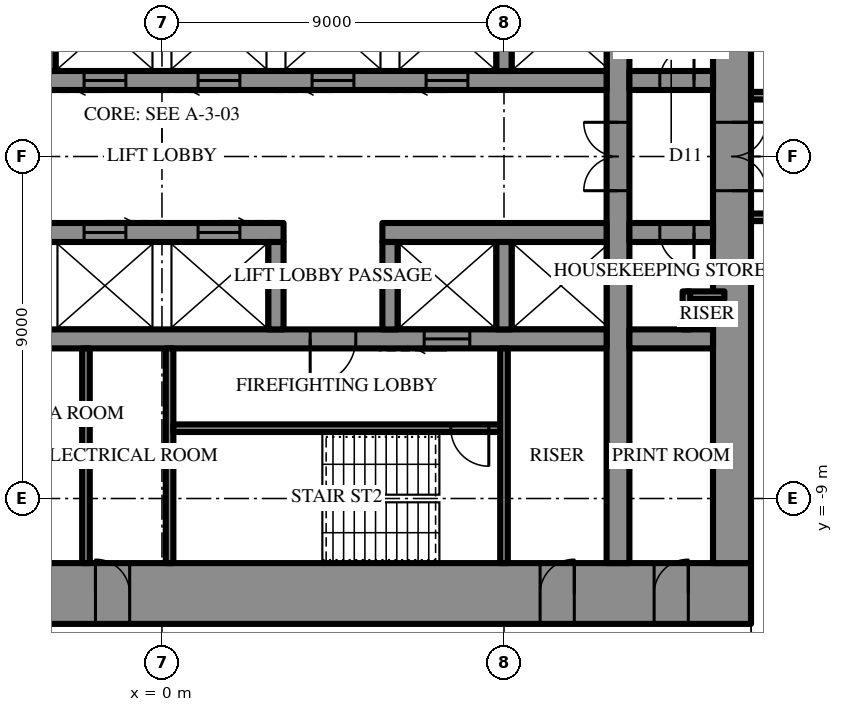
"""IFC4 building model, lengths in metres.
Left out: names, types, materials, properties, quantities, classifications, styles, units other than length and angle.
Written with IfcOpenShell. Run it as: python <this file> out.ifc"""

import sys

from ifc_helpers import new_model, si_unit, direction, frame, frame_2d, origin, place, context, subcontext, project, spatial, rectangle, extrude, element, fill, save


model = new_model("IFC4")
c1 = context("Model", 3, precision=1e-05, world=origin(), true_north=direction((0.0, 1.0)))
c2 = subcontext(c1, "Body", "Model", "MODEL_VIEW")
j1 = project(units=[si_unit("LENGTHUNIT", "METRE"), si_unit("PLANEANGLEUNIT", "RADIAN")], contexts=[c1])
p1 = place(None, origin())
s1 = spatial("IfcSite", under=j1, at=p1, CompositionType="ELEMENT")
p2 = place(p1, origin())
s2 = spatial("IfcBuilding", under=s1, at=p2, CompositionType="ELEMENT")
p3 = place(p2, frame((0.0, 0.0, 253.3)))
s3 = spatial("IfcBuildingStorey", under=s2, at=p3, CompositionType="ELEMENT", Elevation=253.3)
p4 = place(p3, frame((15.5, -11.5, 0.0), z_axis=(0.0, 0.0, 1.0), x_axis=(-1.0, 0.0, 0.0)))
e1 = element("IfcWall", 1, at=p4, inside=s3, PredefinedType="SHEAR", context=c2, shape_type="SweptSolid", body=[
    extrude(rectangle(XDim=31.0, YDim=1.6, at=frame_2d((15.5, 0.0))), origin(), (0.0, 0.0, 1.0), 4.2),
])
p5 = place(p4, frame((16.35, 0.0, 0.0)))
e2 = element("IfcOpeningElement", 2, at=p5, cuts=e1, PredefinedType="OPENING", context=c2, shape_type="SweptSolid", body=[
    extrude(rectangle(XDim=0.9, YDim=2.2, at=frame_2d((0.45, 1.1))), frame((0.0, 0.81, 0.0), z_axis=(0.0, -1.0, 0.0), x_axis=(1.0, 0.0, 0.0)), (0.0, 0.0, 1.0), 1.62),
])
p6 = place(p4, frame((19.35, 0.0, 0.0)))
e3 = element("IfcOpeningElement", 3, at=p6, cuts=e1, PredefinedType="OPENING", context=c2, shape_type="SweptSolid", body=[
    extrude(rectangle(XDim=0.9, YDim=2.2, at=frame_2d((0.45, 1.1))), frame((0.0, 0.81, 0.0), z_axis=(0.0, -1.0, 0.0), x_axis=(1.0, 0.0, 0.0)), (0.0, 0.0, 1.0), 1.62),
])
p7 = place(p4, frame((22.4, 0.0, 0.0)))
e4 = element("IfcOpeningElement", 4, at=p7, cuts=e1, PredefinedType="OPENING", context=c2, shape_type="SweptSolid", body=[
    extrude(rectangle(XDim=1.0, YDim=2.2, at=frame_2d((0.5, 1.1))), frame((0.0, 0.81, 0.0), z_axis=(0.0, -1.0, 0.0), x_axis=(1.0, 0.0, 0.0)), (0.0, 0.0, 1.0), 1.62),
])
p8 = place(p4, frame((1.65, 0.0, 0.0)))
e5 = element("IfcOpeningElement", 5, at=p8, cuts=e1, PredefinedType="OPENING", context=c2, shape_type="SweptSolid", body=[
    extrude(rectangle(XDim=0.9, YDim=2.2, at=frame_2d((0.45, 1.1))), frame((0.0, 0.81, 0.0), z_axis=(0.0, -1.0, 0.0), x_axis=(1.0, 0.0, 0.0)), (0.0, 0.0, 1.0), 1.62),
])
p9 = place(p4, frame((4.65, 0.0, 0.0)))
e6 = element("IfcOpeningElement", 6, at=p9, cuts=e1, PredefinedType="OPENING", context=c2, shape_type="SweptSolid", body=[
    extrude(rectangle(XDim=0.9, YDim=2.2, at=frame_2d((0.45, 1.1))), frame((0.0, 0.81, 0.0), z_axis=(0.0, -1.0, 0.0), x_axis=(1.0, 0.0, 0.0)), (0.0, 0.0, 1.0), 1.62),
])
p10 = place(p4, frame((25.45, 0.0, 0.0)))
e7 = element("IfcOpeningElement", 7, at=p10, cuts=e1, PredefinedType="OPENING", context=c2, shape_type="SweptSolid", body=[
    extrude(rectangle(XDim=0.9, YDim=2.2, at=frame_2d((0.45, 1.1))), frame((0.0, 0.81, 0.0), z_axis=(0.0, -1.0, 0.0), x_axis=(1.0, 0.0, 0.0)), (0.0, 0.0, 1.0), 1.62),
])
p11 = place(p4, frame((28.45, 0.0, 0.0)))
e8 = element("IfcOpeningElement", 8, at=p11, cuts=e1, PredefinedType="OPENING", context=c2, shape_type="SweptSolid", body=[
    extrude(rectangle(XDim=0.9, YDim=2.2, at=frame_2d((0.45, 1.1))), frame((0.0, 0.81, 0.0), z_axis=(0.0, -1.0, 0.0), x_axis=(1.0, 0.0, 0.0)), (0.0, 0.0, 1.0), 1.62),
])
p12 = place(p3, frame((15.0, -10.7, 0.0), z_axis=(0.0, 0.0, 1.0), x_axis=(0.0, 1.0, 0.0)))
e9 = element("IfcWall", 9, at=p12, inside=s3, PredefinedType="SHEAR", context=c2, shape_type="SweptSolid", body=[
    extrude(rectangle(XDim=21.4, YDim=1.0, at=frame_2d((10.7, 0.0))), origin(), (0.0, 0.0, 1.0), 4.2),
])
p13 = place(p12, frame((9.8, 0.0, 0.0)))
e10 = element("IfcOpeningElement", 10, at=p13, cuts=e9, PredefinedType="OPENING", context=c2, shape_type="SweptSolid", body=[
    extrude(rectangle(XDim=1.8, YDim=2.4, at=frame_2d((0.9, 1.2))), frame((0.0, 0.51, 0.0), z_axis=(0.0, -1.0, 0.0), x_axis=(1.0, 0.0, 0.0)), (0.0, 0.0, 1.0), 1.02),
])
p14 = place(p3, frame((12.0, -10.7, 0.0), z_axis=(0.0, 0.0, 1.0), x_axis=(0.0, 1.0, 0.0)))
e11 = element("IfcWall", 11, at=p14, inside=s3, PredefinedType="SHEAR", context=c2, shape_type="SweptSolid", body=[
    extrude(rectangle(XDim=21.4, YDim=0.6, at=frame_2d((10.7, 0.0))), origin(), (0.0, 0.0, 1.0), 4.2),
])
p15 = place(p14, frame((9.8, 0.0, 0.0)))
e12 = element("IfcOpeningElement", 12, at=p15, cuts=e11, PredefinedType="OPENING", context=c2, shape_type="SweptSolid", body=[
    extrude(rectangle(XDim=1.8, YDim=2.4, at=frame_2d((0.9, 1.2))), frame((0.0, 0.31, 0.0), z_axis=(0.0, -1.0, 0.0), x_axis=(1.0, 0.0, 0.0)), (0.0, 0.0, 1.0), 0.62),
])
p16 = place(p3, frame((-3.2, 2.0, 0.0), z_axis=(0.0, 0.0, 1.0), x_axis=(1.0, 0.0, 0.0)))
e13 = element("IfcWall", 13, at=p16, inside=s3, PredefinedType="SHEAR", context=c2, shape_type="SweptSolid", body=[
    extrude(rectangle(XDim=14.9, YDim=0.5, at=frame_2d((7.45, 0.0))), origin(), (0.0, 0.0, 1.0), 4.2),
])
p17 = place(p16, frame((1.15, 0.0, 0.0)))
e14 = element("IfcOpeningElement", 14, at=p17, cuts=e13, PredefinedType="OPENING", context=c2, shape_type="SweptSolid", body=[
    extrude(rectangle(XDim=1.1, YDim=2.2, at=frame_2d((0.55, 1.1))), frame((0.0, 0.26, 0.0), z_axis=(0.0, -1.0, 0.0), x_axis=(1.0, 0.0, 0.0)), (0.0, 0.0, 1.0), 0.52),
])
p18 = place(p16, frame((4.15, 0.0, 0.0)))
e15 = element("IfcOpeningElement", 15, at=p18, cuts=e13, PredefinedType="OPENING", context=c2, shape_type="SweptSolid", body=[
    extrude(rectangle(XDim=1.1, YDim=2.2, at=frame_2d((0.55, 1.1))), frame((0.0, 0.26, 0.0), z_axis=(0.0, -1.0, 0.0), x_axis=(1.0, 0.0, 0.0)), (0.0, 0.0, 1.0), 0.52),
])
p19 = place(p16, frame((7.15, 0.0, 0.0)))
e16 = element("IfcOpeningElement", 16, at=p19, cuts=e13, PredefinedType="OPENING", context=c2, shape_type="SweptSolid", body=[
    extrude(rectangle(XDim=1.1, YDim=2.2, at=frame_2d((0.55, 1.1))), frame((0.0, 0.26, 0.0), z_axis=(0.0, -1.0, 0.0), x_axis=(1.0, 0.0, 0.0)), (0.0, 0.0, 1.0), 0.52),
])
p20 = place(p16, frame((10.15, 0.0, 0.0)))
e17 = element("IfcOpeningElement", 17, at=p20, cuts=e13, PredefinedType="OPENING", context=c2, shape_type="SweptSolid", body=[
    extrude(rectangle(XDim=1.1, YDim=2.2, at=frame_2d((0.55, 1.1))), frame((0.0, 0.26, 0.0), z_axis=(0.0, -1.0, 0.0), x_axis=(1.0, 0.0, 0.0)), (0.0, 0.0, 1.0), 0.52),
])
p21 = place(p3, frame((12.3, 2.0, 0.0), z_axis=(0.0, 0.0, 1.0), x_axis=(1.0, 0.0, 0.0)))
e18 = element("IfcWall", 18, at=p21, inside=s3, PredefinedType="SHEAR", context=c2, shape_type="SweptSolid", body=[
    extrude(rectangle(XDim=2.2, YDim=0.5, at=frame_2d((1.1, 0.0))), origin(), (0.0, 0.0, 1.0), 4.2),
])
p22 = place(p21, frame((0.8, 0.0, 0.0)))
e19 = element("IfcOpeningElement", 19, at=p22, cuts=e18, PredefinedType="OPENING", context=c2, shape_type="SweptSolid", body=[
    extrude(rectangle(XDim=0.9, YDim=2.2, at=frame_2d((0.45, 1.1))), frame((0.0, 0.26, 0.0), z_axis=(0.0, -1.0, 0.0), x_axis=(1.0, 0.0, 0.0)), (0.0, 0.0, 1.0), 0.52),
])
for number, where, z_axis, x_axis in (
    (20, (-3.0, 2.25, 0.0), (0.0, 0.0, 1.0), (0.0, 1.0, 0.0)),
    (21, (9.0, 2.25, 0.0), (0.0, 0.0, 1.0), (0.0, 1.0, 0.0)),
):
    element("IfcWall", number, at=place(p3, frame(where, z_axis=z_axis, x_axis=x_axis)), inside=s3, PredefinedType="SHEAR", context=c2, shape_type="SweptSolid", body=[
        extrude(rectangle(XDim=2.3, YDim=0.4, at=frame_2d((1.15, 0.0))), origin(), (0.0, 0.0, 1.0), 4.2),
    ])
p23 = place(p3, frame((14.5, -2.0, 0.0), z_axis=(0.0, 0.0, 1.0), x_axis=(-1.0, 0.0, 0.0)))
e22 = element("IfcWall", 22, at=p23, inside=s3, PredefinedType="SHEAR", context=c2, shape_type="SweptSolid", body=[
    extrude(rectangle(XDim=2.2, YDim=0.5, at=frame_2d((1.1, 0.0))), origin(), (0.0, 0.0, 1.0), 4.2),
])
p24 = place(p23, frame((0.5, 0.0, 0.0)))
e23 = element("IfcOpeningElement", 23, at=p24, cuts=e22, PredefinedType="OPENING", context=c2, shape_type="SweptSolid", body=[
    extrude(rectangle(XDim=0.9, YDim=2.2, at=frame_2d((0.45, 1.1))), frame((0.0, 0.26, 0.0), z_axis=(0.0, -1.0, 0.0), x_axis=(1.0, 0.0, 0.0)), (0.0, 0.0, 1.0), 0.52),
])
p25 = place(p3, frame((11.7, -2.0, 0.0), z_axis=(0.0, 0.0, 1.0), x_axis=(-1.0, 0.0, 0.0)))
e24 = element("IfcWall", 24, at=p25, inside=s3, PredefinedType="SHEAR", context=c2, shape_type="SweptSolid", body=[
    extrude(rectangle(XDim=5.9, YDim=0.5, at=frame_2d((2.95, 0.0))), origin(), (0.0, 0.0, 1.0), 4.2),
])
p26 = place(p3, frame((3.2, -2.0, 0.0), z_axis=(0.0, 0.0, 1.0), x_axis=(-1.0, 0.0, 0.0)))
e25 = element("IfcWall", 25, at=p26, inside=s3, PredefinedType="SHEAR", context=c2, shape_type="SweptSolid", body=[
    extrude(rectangle(XDim=14.9, YDim=0.5, at=frame_2d((7.45, 0.0))), origin(), (0.0, 0.0, 1.0), 4.2),
])
p27 = place(p26, frame((1.15, 0.0, 0.0)))
e26 = element("IfcOpeningElement", 26, at=p27, cuts=e25, PredefinedType="OPENING", context=c2, shape_type="SweptSolid", body=[
    extrude(rectangle(XDim=1.1, YDim=2.2, at=frame_2d((0.55, 1.1))), frame((0.0, 0.26, 0.0), z_axis=(0.0, -1.0, 0.0), x_axis=(1.0, 0.0, 0.0)), (0.0, 0.0, 1.0), 0.52),
])
p28 = place(p26, frame((4.15, 0.0, 0.0)))
e27 = element("IfcOpeningElement", 27, at=p28, cuts=e25, PredefinedType="OPENING", context=c2, shape_type="SweptSolid", body=[
    extrude(rectangle(XDim=1.1, YDim=2.2, at=frame_2d((0.55, 1.1))), frame((0.0, 0.26, 0.0), z_axis=(0.0, -1.0, 0.0), x_axis=(1.0, 0.0, 0.0)), (0.0, 0.0, 1.0), 0.52),
])
p29 = place(p26, frame((7.15, 0.0, 0.0)))
e28 = element("IfcOpeningElement", 28, at=p29, cuts=e25, PredefinedType="OPENING", context=c2, shape_type="SweptSolid", body=[
    extrude(rectangle(XDim=1.1, YDim=2.2, at=frame_2d((0.55, 1.1))), frame((0.0, 0.26, 0.0), z_axis=(0.0, -1.0, 0.0), x_axis=(1.0, 0.0, 0.0)), (0.0, 0.0, 1.0), 0.52),
])
p30 = place(p26, frame((10.15, 0.0, 0.0)))
e29 = element("IfcOpeningElement", 29, at=p30, cuts=e25, PredefinedType="OPENING", context=c2, shape_type="SweptSolid", body=[
    extrude(rectangle(XDim=1.1, YDim=2.2, at=frame_2d((0.55, 1.1))), frame((0.0, 0.26, 0.0), z_axis=(0.0, -1.0, 0.0), x_axis=(1.0, 0.0, 0.0)), (0.0, 0.0, 1.0), 0.52),
])
p31 = place(p3, frame((14.5, -4.8, 0.0), z_axis=(0.0, 0.0, 1.0), x_axis=(-1.0, 0.0, 0.0)))
e30 = element("IfcWall", 30, at=p31, inside=s3, PredefinedType="SHEAR", context=c2, shape_type="SweptSolid", body=[
    extrude(rectangle(XDim=2.2, YDim=0.5, at=frame_2d((1.1, 0.0))), origin(), (0.0, 0.0, 1.0), 4.2),
])
p32 = place(p3, frame((11.7, -4.8, 0.0), z_axis=(0.0, 0.0, 1.0), x_axis=(-1.0, 0.0, 0.0)))
e31 = element("IfcWall", 31, at=p32, inside=s3, PredefinedType="SHEAR", context=c2, shape_type="SweptSolid", body=[
    extrude(rectangle(XDim=23.4, YDim=0.5, at=frame_2d((11.7, 0.0))), origin(), (0.0, 0.0, 1.0), 4.2),
])
p33 = place(p32, frame((6.6, 0.0, 0.0)))
e32 = element("IfcOpeningElement", 32, at=p33, cuts=e31, PredefinedType="OPENING", context=c2, shape_type="SweptSolid", body=[
    extrude(rectangle(XDim=1.2, YDim=2.2, at=frame_2d((0.6, 1.1))), frame((0.0, 0.26, 0.0), z_axis=(0.0, -1.0, 0.0), x_axis=(1.0, 0.0, 0.0)), (0.0, 0.0, 1.0), 0.52),
])
p34 = place(p32, frame((3.6, 0.0, 0.0)))
e33 = element("IfcOpeningElement", 33, at=p34, cuts=e31, PredefinedType="OPENING", context=c2, shape_type="SweptSolid", body=[
    extrude(rectangle(XDim=1.2, YDim=2.2, at=frame_2d((0.6, 1.1))), frame((0.0, 0.26, 0.0), z_axis=(0.0, -1.0, 0.0), x_axis=(1.0, 0.0, 0.0)), (0.0, 0.0, 1.0), 0.52),
])
for number, where, z_axis, x_axis in (
    (34, (9.0, -2.25, 0.0), (0.0, 0.0, 1.0), (0.0, -1.0, 0.0)),
    (35, (6.0, -2.25, 0.0), (0.0, 0.0, 1.0), (0.0, -1.0, 0.0)),
    (36, (3.0, -2.25, 0.0), (0.0, 0.0, 1.0), (0.0, -1.0, 0.0)),
):
    element("IfcWall", number, at=place(p3, frame(where, z_axis=z_axis, x_axis=x_axis)), inside=s3, PredefinedType="SHEAR", context=c2, shape_type="SweptSolid", body=[
        extrude(rectangle(XDim=2.3, YDim=0.4, at=frame_2d((1.15, 0.0))), origin(), (0.0, 0.0, 1.0), 4.2),
    ])
p35 = place(p3, frame((0.2, -5.05, 0.0), z_axis=(0.0, 0.0, 1.0), x_axis=(0.0, -1.0, 0.0)))
e37 = element("IfcWall", 37, at=p35, inside=s3, PredefinedType="SHEAR", context=c2, shape_type="SweptSolid", body=[
    extrude(rectangle(XDim=5.65, YDim=0.2, at=frame_2d((2.825, 0.0))), origin(), (0.0, 0.0, 1.0), 4.2),
])
p36 = place(p3, frame((8.9, -7.15, 0.0), z_axis=(0.0, 0.0, 1.0), x_axis=(-1.0, 0.0, 0.0)))
e38 = element("IfcWall", 38, at=p36, inside=s3, PredefinedType="SHEAR", context=c2, shape_type="SweptSolid", body=[
    extrude(rectangle(XDim=8.6, YDim=0.2, at=frame_2d((4.3, 0.0))), origin(), (0.0, 0.0, 1.0), 4.2),
])
p37 = place(p36, frame((0.3, 0.0, 0.0)))
e39 = element("IfcOpeningElement", 39, at=p37, cuts=e38, PredefinedType="OPENING", context=c2, shape_type="SweptSolid", body=[
    extrude(rectangle(XDim=1.0, YDim=2.2, at=frame_2d((0.5, 1.1))), frame((0.0, 0.11, 0.0), z_axis=(0.0, -1.0, 0.0), x_axis=(1.0, 0.0, 0.0)), (0.0, 0.0, 1.0), 0.22),
])
for number, where, z_axis, x_axis in (
    (40, (9.0, -5.05, 0.0), (0.0, 0.0, 1.0), (0.0, -1.0, 0.0)),
    (41, (-2.0, -5.05, 0.0), (0.0, 0.0, 1.0), (0.0, -1.0, 0.0)),
):
    element("IfcWall", number, at=place(p3, frame(where, z_axis=z_axis, x_axis=x_axis)), inside=s3, PredefinedType="PARTITIONING", context=c2, shape_type="SweptSolid", body=[
        extrude(rectangle(XDim=5.65, YDim=0.2, at=frame_2d((2.825, 0.0))), origin(), (0.0, 0.0, 1.0), 4.0),
    ])
for number, where, z_axis, x_axis in (
    (42, (14.8, -3.65, 0.0), (0.0, 0.0, 1.0), (-1.0, 0.0, 0.0)),
    (43, (13.8, -3.55, 0.0), (0.0, 0.0, 1.0), (0.0, -1.0, 0.0)),
):
    element("IfcWall", number, at=place(p3, frame(where, z_axis=z_axis, x_axis=x_axis)), inside=s3, PredefinedType="PARTITIONING", context=c2, shape_type="SweptSolid", body=[
        extrude(rectangle(XDim=1.0, YDim=0.2, at=frame_2d((0.5, 0.0))), origin(), (0.0, 0.0, 1.0), 4.0),
    ])
p38 = place(p3, frame((15.5, 1.6, 0.0), z_axis=(0.0, 0.0, 1.0), x_axis=(1.0, 0.0, 0.0)))
e44 = element("IfcWall", 44, at=p38, inside=s3, PredefinedType="PARTITIONING", context=c2, shape_type="SweptSolid", body=[
    extrude(rectangle(XDim=2.3, YDim=0.2, at=frame_2d((1.15, 0.0))), origin(), (0.0, 0.0, 1.0), 4.0),
])
p39 = place(p3, frame((15.5, -1.6, 0.0), z_axis=(0.0, 0.0, 1.0), x_axis=(1.0, 0.0, 0.0)))
e45 = element("IfcWall", 45, at=p39, inside=s3, PredefinedType="PARTITIONING", context=c2, shape_type="SweptSolid", body=[
    extrude(rectangle(XDim=12.2, YDim=0.2, at=frame_2d((6.1, 0.0))), origin(), (0.0, 0.0, 1.0), 4.0),
])
p40 = place(p39, frame((5.6, 0.0, 0.0)))
e46 = element("IfcOpeningElement", 46, at=p40, cuts=e45, PredefinedType="OPENING", context=c2, shape_type="SweptSolid", body=[
    extrude(rectangle(XDim=1.0, YDim=2.2, at=frame_2d((0.5, 1.1))), frame((0.0, 0.11, 0.0), z_axis=(0.0, -1.0, 0.0), x_axis=(1.0, 0.0, 0.0)), (0.0, 0.0, 1.0), 0.22),
])
p41 = place(p13, frame((1.8, 0.0, 0.0), z_axis=(0.0, 0.0, 1.0), x_axis=(-1.0, 0.0, 0.0)))
e47 = element("IfcDoor", 47, at=p41, inside=s3, OperationType="DOUBLE_DOOR_SINGLE_SWING", PredefinedType="DOOR", context=c2, shape_type="SweptSolid", body=[
    extrude(rectangle(XDim=1.8, YDim=2.4, at=frame_2d((0.9, 1.2))), frame((0.0, 0.025, 0.0), z_axis=(0.0, -1.0, 0.0), x_axis=(1.0, 0.0, 0.0)), (0.0, 0.0, 1.0), 0.05),
])
fill(e10, e47)
p42 = place(p33, origin())
e48 = element("IfcDoor", 48, at=p42, inside=s3, OperationType="SINGLE_SWING_LEFT", PredefinedType="DOOR", context=c2, shape_type="SweptSolid", body=[
    extrude(rectangle(XDim=1.2, YDim=2.2, at=frame_2d((0.6, 1.1))), frame((0.0, 0.025, 0.0), z_axis=(0.0, -1.0, 0.0), x_axis=(1.0, 0.0, 0.0)), (0.0, 0.0, 1.0), 0.05),
])
fill(e32, e48)
p43 = place(p37, origin())
e49 = element("IfcDoor", 49, at=p43, inside=s3, OperationType="SINGLE_SWING_RIGHT", PredefinedType="DOOR", context=c2, shape_type="SweptSolid", body=[
    extrude(rectangle(XDim=1.0, YDim=2.2, at=frame_2d((0.5, 1.1))), frame((0.0, 0.025, 0.0), z_axis=(0.0, -1.0, 0.0), x_axis=(1.0, 0.0, 0.0)), (0.0, 0.0, 1.0), 0.05),
])
fill(e39, e49)
p44 = place(p5, frame((0.9, 0.0, 0.0), z_axis=(0.0, 0.0, 1.0), x_axis=(-1.0, 0.0, 0.0)))
e50 = element("IfcDoor", 50, at=p44, inside=s3, OperationType="SINGLE_SWING_RIGHT", PredefinedType="DOOR", context=c2, shape_type="SweptSolid", body=[
    extrude(rectangle(XDim=0.9, YDim=2.2, at=frame_2d((0.45, 1.1))), frame((0.0, 0.025, 0.0), z_axis=(0.0, -1.0, 0.0), x_axis=(1.0, 0.0, 0.0)), (0.0, 0.0, 1.0), 0.05),
])
fill(e2, e50)
p45 = place(p8, frame((0.9, 0.0, 0.0), z_axis=(0.0, 0.0, 1.0), x_axis=(-1.0, 0.0, 0.0)))
e51 = element("IfcDoor", 51, at=p45, inside=s3, OperationType="SINGLE_SWING_LEFT", PredefinedType="DOOR", context=c2, shape_type="SweptSolid", body=[
    extrude(rectangle(XDim=0.9, YDim=2.2, at=frame_2d((0.45, 1.1))), frame((0.0, 0.025, 0.0), z_axis=(0.0, -1.0, 0.0), x_axis=(1.0, 0.0, 0.0)), (0.0, 0.0, 1.0), 0.05),
])
fill(e5, e51)
p46 = place(p9, frame((0.9, 0.0, 0.0), z_axis=(0.0, 0.0, 1.0), x_axis=(-1.0, 0.0, 0.0)))
e52 = element("IfcDoor", 52, at=p46, inside=s3, OperationType="SINGLE_SWING_LEFT", PredefinedType="DOOR", context=c2, shape_type="SweptSolid", body=[
    extrude(rectangle(XDim=0.9, YDim=2.2, at=frame_2d((0.45, 1.1))), frame((0.0, 0.025, 0.0), z_axis=(0.0, -1.0, 0.0), x_axis=(1.0, 0.0, 0.0)), (0.0, 0.0, 1.0), 0.05),
])
fill(e6, e52)
p47 = place(p22, origin())
e53 = element("IfcDoor", 53, at=p47, inside=s3, OperationType="SINGLE_SWING_LEFT", PredefinedType="DOOR", context=c2, shape_type="SweptSolid", body=[
    extrude(rectangle(XDim=0.9, YDim=2.2, at=frame_2d((0.45, 1.1))), frame((0.0, 0.025, 0.0), z_axis=(0.0, -1.0, 0.0), x_axis=(1.0, 0.0, 0.0)), (0.0, 0.0, 1.0), 0.05),
])
fill(e19, e53)
p48 = place(p24, origin())
e54 = element("IfcDoor", 54, at=p48, inside=s3, OperationType="SINGLE_SWING_RIGHT", PredefinedType="DOOR", context=c2, shape_type="SweptSolid", body=[
    extrude(rectangle(XDim=0.9, YDim=2.2, at=frame_2d((0.45, 1.1))), frame((0.0, 0.025, 0.0), z_axis=(0.0, -1.0, 0.0), x_axis=(1.0, 0.0, 0.0)), (0.0, 0.0, 1.0), 0.05),
])
fill(e23, e54)
p49 = place(p15, origin())
e55 = element("IfcDoor", 55, at=p49, inside=s3, OperationType="DOUBLE_DOOR_SINGLE_SWING", PredefinedType="DOOR", context=c2, shape_type="SweptSolid", body=[
    extrude(rectangle(XDim=1.8, YDim=2.4, at=frame_2d((0.9, 1.2))), frame((0.0, 0.025, 0.0), z_axis=(0.0, -1.0, 0.0), x_axis=(1.0, 0.0, 0.0)), (0.0, 0.0, 1.0), 0.05),
])
fill(e12, e55)
p50 = place(p17, frame((1.1, 0.0, 0.0), z_axis=(0.0, 0.0, 1.0), x_axis=(-1.0, 0.0, 0.0)))
e56 = element("IfcDoor", 56, at=p50, inside=s3, OperationType="SLIDING_TO_LEFT", PredefinedType="DOOR", context=c2, shape_type="SweptSolid", body=[
    extrude(rectangle(XDim=1.1, YDim=2.2, at=frame_2d((0.55, 1.1))), frame((0.0, 0.025, 0.0), z_axis=(0.0, -1.0, 0.0), x_axis=(1.0, 0.0, 0.0)), (0.0, 0.0, 1.0), 0.05),
])
fill(e14, e56)
p51 = place(p18, frame((1.1, 0.0, 0.0), z_axis=(0.0, 0.0, 1.0), x_axis=(-1.0, 0.0, 0.0)))
e57 = element("IfcDoor", 57, at=p51, inside=s3, OperationType="SLIDING_TO_LEFT", PredefinedType="DOOR", context=c2, shape_type="SweptSolid", body=[
    extrude(rectangle(XDim=1.1, YDim=2.2, at=frame_2d((0.55, 1.1))), frame((0.0, 0.025, 0.0), z_axis=(0.0, -1.0, 0.0), x_axis=(1.0, 0.0, 0.0)), (0.0, 0.0, 1.0), 0.05),
])
fill(e15, e57)
p52 = place(p19, frame((1.1, 0.0, 0.0), z_axis=(0.0, 0.0, 1.0), x_axis=(-1.0, 0.0, 0.0)))
e58 = element("IfcDoor", 58, at=p52, inside=s3, OperationType="SLIDING_TO_LEFT", PredefinedType="DOOR", context=c2, shape_type="SweptSolid", body=[
    extrude(rectangle(XDim=1.1, YDim=2.2, at=frame_2d((0.55, 1.1))), frame((0.0, 0.025, 0.0), z_axis=(0.0, -1.0, 0.0), x_axis=(1.0, 0.0, 0.0)), (0.0, 0.0, 1.0), 0.05),
])
fill(e16, e58)
p53 = place(p20, frame((1.1, 0.0, 0.0), z_axis=(0.0, 0.0, 1.0), x_axis=(-1.0, 0.0, 0.0)))
e59 = element("IfcDoor", 59, at=p53, inside=s3, OperationType="SLIDING_TO_LEFT", PredefinedType="DOOR", context=c2, shape_type="SweptSolid", body=[
    extrude(rectangle(XDim=1.1, YDim=2.2, at=frame_2d((0.55, 1.1))), frame((0.0, 0.025, 0.0), z_axis=(0.0, -1.0, 0.0), x_axis=(1.0, 0.0, 0.0)), (0.0, 0.0, 1.0), 0.05),
])
fill(e17, e59)
p54 = place(p34, origin())
e60 = element("IfcDoor", 60, at=p54, inside=s3, OperationType="SLIDING_TO_LEFT", PredefinedType="DOOR", context=c2, shape_type="SweptSolid", body=[
    extrude(rectangle(XDim=1.2, YDim=2.2, at=frame_2d((0.6, 1.1))), frame((0.0, 0.025, 0.0), z_axis=(0.0, -1.0, 0.0), x_axis=(1.0, 0.0, 0.0)), (0.0, 0.0, 1.0), 0.05),
])
fill(e33, e60)
p55 = place(p27, frame((1.1, 0.0, 0.0), z_axis=(0.0, 0.0, 1.0), x_axis=(-1.0, 0.0, 0.0)))
e61 = element("IfcDoor", 61, at=p55, inside=s3, OperationType="SLIDING_TO_LEFT", PredefinedType="DOOR", context=c2, shape_type="SweptSolid", body=[
    extrude(rectangle(XDim=1.1, YDim=2.2, at=frame_2d((0.55, 1.1))), frame((0.0, 0.025, 0.0), z_axis=(0.0, -1.0, 0.0), x_axis=(1.0, 0.0, 0.0)), (0.0, 0.0, 1.0), 0.05),
])
fill(e26, e61)
p56 = place(p28, frame((1.1, 0.0, 0.0), z_axis=(0.0, 0.0, 1.0), x_axis=(-1.0, 0.0, 0.0)))
e62 = element("IfcDoor", 62, at=p56, inside=s3, OperationType="SLIDING_TO_LEFT", PredefinedType="DOOR", context=c2, shape_type="SweptSolid", body=[
    extrude(rectangle(XDim=1.1, YDim=2.2, at=frame_2d((0.55, 1.1))), frame((0.0, 0.025, 0.0), z_axis=(0.0, -1.0, 0.0), x_axis=(1.0, 0.0, 0.0)), (0.0, 0.0, 1.0), 0.05),
])
fill(e27, e62)
save(model, sys.argv[1])
